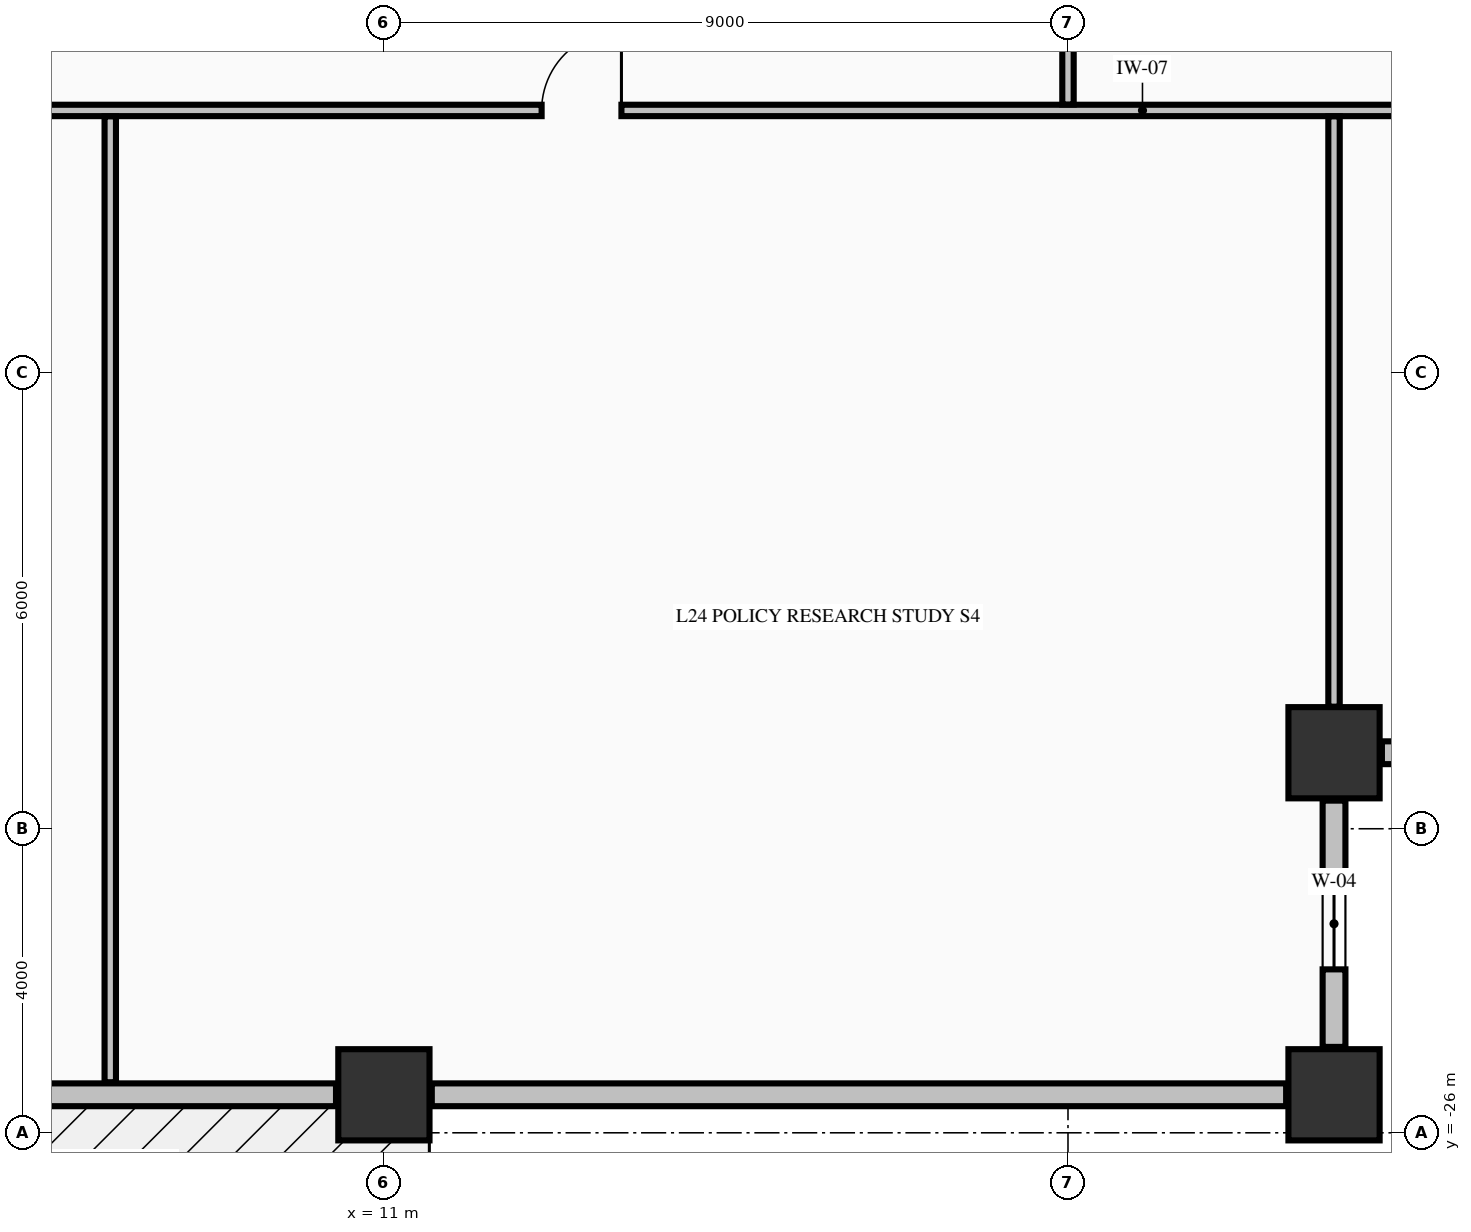
"""IFC4 building model, lengths in metres.
Left out: names, types, materials, properties, quantities, classifications, styles, units other than length and angle.
Written with IfcOpenShell. Run it as: python <this file> out.ifc"""

import sys

from ifc_helpers import new_model, si_unit, direction, frame, frame_2d, origin, origin_2d, place, context, subcontext, project, spatial, rectangle, extrude, element, fill, save


model = new_model("IFC4")
c1 = context("Model", 3, precision=1e-05, world=origin(), true_north=direction((0.0, 1.0)))
c2 = subcontext(c1, "Body", "Model", "MODEL_VIEW")
j1 = project(units=[si_unit("LENGTHUNIT", "METRE"), si_unit("PLANEANGLEUNIT", "RADIAN")], contexts=[c1])
p1 = place(None, origin())
s1 = spatial("IfcSite", under=j1, at=p1, CompositionType="ELEMENT")
p2 = place(p1, origin())
s2 = spatial("IfcBuilding", under=s1, at=p2, CompositionType="ELEMENT")
p3 = place(p2, frame((0.0, 0.0, 98.5)))
s3 = spatial("IfcBuildingStorey", under=s2, at=p3, CompositionType="ELEMENT", Elevation=98.5)
for number, where, z_axis, x_axis in (
    (1, (11.0, -25.5, -0.275), (0.0, 0.0, 1.0), (1.0, 0.0, 0.0)),
    (2, (23.5, -25.5, -0.275), (0.0, 0.0, 1.0), (1.0, 0.0, 0.0)),
    (3, (23.5, -21.0, -0.275), (0.0, 0.0, 1.0), (1.0, 0.0, 0.0)),
):
    element("IfcColumn", number, at=place(p3, frame(where, z_axis=z_axis, x_axis=x_axis)), inside=s3, PredefinedType="COLUMN", context=c2, shape_type="SweptSolid", body=[
        extrude(rectangle(XDim=1.2, YDim=1.2, at=origin_2d()), origin(), (0.0, 0.0, 1.0), 3.595),
    ])
p4 = place(p3, frame((23.5, -24.87, 0.0), z_axis=(0.0, 0.0, 1.0), x_axis=(0.0, 1.0, 0.0)))
e4 = element("IfcWall", 4, at=p4, inside=s3, PredefinedType="STANDARD", context=c2, shape_type="SweptSolid", body=[
    extrude(rectangle(XDim=3.24, YDim=0.3, at=frame_2d((1.62, 0.0))), origin(), (0.0, 0.0, 1.0), 2.712),
])
p5 = place(p4, frame((1.02, 0.0, 0.82)))
e5 = element("IfcOpeningElement", 5, at=p5, cuts=e4, PredefinedType="OPENING", context=c2, shape_type="SweptSolid", body=[
    extrude(rectangle(XDim=1.2, YDim=1.65, at=frame_2d((0.6, 0.825))), frame((0.0, 0.16, 0.0), z_axis=(0.0, -1.0, 0.0), x_axis=(1.0, 0.0, 0.0)), (0.0, 0.0, 1.0), 0.32),
])
p6 = place(p3, frame((24.13, -21.0, 0.0), z_axis=(0.0, 0.0, 1.0), x_axis=(1.0, 0.0, 0.0)))
e6 = element("IfcWall", 6, at=p6, inside=s3, PredefinedType="STANDARD", context=c2, shape_type="SweptSolid", body=[
    extrude(rectangle(XDim=3.24, YDim=0.3, at=frame_2d((1.62, 0.0))), origin(), (0.0, 0.0, 1.0), 2.712),
])
p7 = place(p6, frame((1.02, 0.0, 0.82)))
e7 = element("IfcOpeningElement", 7, at=p7, cuts=e6, PredefinedType="OPENING", context=c2, shape_type="SweptSolid", body=[
    extrude(rectangle(XDim=1.2, YDim=1.65, at=frame_2d((0.6, 0.825))), frame((0.0, 0.16, 0.0), z_axis=(0.0, -1.0, 0.0), x_axis=(1.0, 0.0, 0.0)), (0.0, 0.0, 1.0), 0.32),
])
p8 = place(p3, frame((0.63, -25.5, 0.0), z_axis=(0.0, 0.0, 1.0), x_axis=(1.0, 0.0, 0.0)))
e8 = element("IfcWall", 8, at=p8, inside=s3, PredefinedType="STANDARD", context=c2, shape_type="SweptSolid", body=[
    extrude(rectangle(XDim=9.74, YDim=0.3, at=frame_2d((4.87, 0.0))), origin(), (0.0, 0.0, 1.0), 2.712),
])
p9 = place(p8, frame((1.123, 0.0, 0.8)))
e9 = element("IfcOpeningElement", 9, at=p9, cuts=e8, PredefinedType="OPENING", context=c2, shape_type="SweptSolid", body=[
    extrude(rectangle(XDim=1.65, YDim=1.7, at=frame_2d((0.825, 0.85))), frame((0.0, 0.16, 0.0), z_axis=(0.0, -1.0, 0.0), x_axis=(1.0, 0.0, 0.0)), (0.0, 0.0, 1.0), 0.32),
])
p10 = place(p8, frame((3.071, 0.0, 0.8)))
e10 = element("IfcOpeningElement", 10, at=p10, cuts=e8, PredefinedType="OPENING", context=c2, shape_type="SweptSolid", body=[
    extrude(rectangle(XDim=1.65, YDim=1.7, at=frame_2d((0.825, 0.85))), frame((0.0, 0.16, 0.0), z_axis=(0.0, -1.0, 0.0), x_axis=(1.0, 0.0, 0.0)), (0.0, 0.0, 1.0), 0.32),
])
p11 = place(p3, frame((11.63, -25.5, 0.0), z_axis=(0.0, 0.0, 1.0), x_axis=(1.0, 0.0, 0.0)))
e11 = element("IfcWall", 11, at=p11, inside=s3, PredefinedType="STANDARD", context=c2, shape_type="SweptSolid", body=[
    extrude(rectangle(XDim=11.24, YDim=0.3, at=frame_2d((5.62, 0.0))), origin(), (0.0, 0.0, 1.0), 2.712),
])
p12 = place(p3, frame((-22.835, -12.55, 0.0), z_axis=(0.0, 0.0, 1.0), x_axis=(1.0, 0.0, 0.0)))
e12 = element("IfcWall", 12, at=p12, inside=s3, PredefinedType="PARTITIONING", context=c2, shape_type="SweptSolid", body=[
    extrude(rectangle(XDim=50.67, YDim=0.15, at=frame_2d((25.335, 0.0))), origin(), (0.0, 0.0, 1.0), 3.32),
])
p13 = place(p12, frame((7.01, 0.0, 0.0)))
e13 = element("IfcOpeningElement", 13, at=p13, cuts=e12, PredefinedType="OPENING", context=c2, shape_type="SweptSolid", body=[
    extrude(rectangle(XDim=0.95, YDim=2.15, at=frame_2d((0.475, 1.075))), frame((0.0, 0.085, 0.0), z_axis=(0.0, -1.0, 0.0), x_axis=(1.0, 0.0, 0.0)), (0.0, 0.0, 1.0), 0.17),
])
p14 = place(p12, frame((14.91, 0.0, 0.0)))
e14 = element("IfcOpeningElement", 14, at=p14, cuts=e12, PredefinedType="OPENING", context=c2, shape_type="SweptSolid", body=[
    extrude(rectangle(XDim=1.05, YDim=2.15, at=frame_2d((0.525, 1.075))), frame((0.0, 0.085, 0.0), z_axis=(0.0, -1.0, 0.0), x_axis=(1.0, 0.0, 0.0)), (0.0, 0.0, 1.0), 0.17),
])
p15 = place(p12, frame((24.71, 0.0, 0.0)))
e15 = element("IfcOpeningElement", 15, at=p15, cuts=e12, PredefinedType="OPENING", context=c2, shape_type="SweptSolid", body=[
    extrude(rectangle(XDim=1.05, YDim=2.15, at=frame_2d((0.525, 1.075))), frame((0.0, 0.085, 0.0), z_axis=(0.0, -1.0, 0.0), x_axis=(1.0, 0.0, 0.0)), (0.0, 0.0, 1.0), 0.17),
])
p16 = place(p12, frame((35.91, 0.0, 0.0)))
e16 = element("IfcOpeningElement", 16, at=p16, cuts=e12, PredefinedType="OPENING", context=c2, shape_type="SweptSolid", body=[
    extrude(rectangle(XDim=1.05, YDim=2.15, at=frame_2d((0.525, 1.075))), frame((0.0, 0.085, 0.0), z_axis=(0.0, -1.0, 0.0), x_axis=(1.0, 0.0, 0.0)), (0.0, 0.0, 1.0), 0.17),
])
p17 = place(p3, frame((7.4, -25.335, 0.0), z_axis=(0.0, 0.0, 1.0), x_axis=(0.0, 1.0, 0.0)))
e17 = element("IfcWall", 17, at=p17, inside=s3, PredefinedType="PARTITIONING", context=c2, shape_type="SweptSolid", body=[
    extrude(rectangle(XDim=12.707, YDim=0.15, at=frame_2d((6.354, 0.0))), origin(), (0.0, 0.0, 1.0), 3.32),
])
p18 = place(p3, frame((20.0, -12.472, 0.0), z_axis=(0.0, 0.0, 1.0), x_axis=(0.0, 1.0, 0.0)))
e18 = element("IfcWall", 18, at=p18, inside=s3, PredefinedType="PARTITIONING", context=c2, shape_type="SweptSolid", body=[
    extrude(rectangle(XDim=2.016, YDim=0.15, at=frame_2d((1.008, 0.0))), origin(), (0.0, 0.0, 1.0), 2.81),
])
p19 = place(p18, frame((0.747, 0.0, 0.0)))
e19 = element("IfcOpeningElement", 19, at=p19, cuts=e18, PredefinedType="OPENING", context=c2, shape_type="SweptSolid", body=[
    extrude(rectangle(XDim=0.95, YDim=2.15, at=frame_2d((0.475, 1.075))), frame((0.0, 0.085, 0.0), z_axis=(0.0, -1.0, 0.0), x_axis=(1.0, 0.0, 0.0)), (0.0, 0.0, 1.0), 0.17),
])
p20 = place(p3, frame((23.5, -20.394, 0.0), z_axis=(0.0, 0.0, 1.0), x_axis=(0.0, 1.0, 0.0)))
e20 = element("IfcWall", 20, at=p20, inside=s3, PredefinedType="PARTITIONING", context=c2, shape_type="SweptSolid", body=[
    extrude(rectangle(XDim=7.766, YDim=0.15, at=frame_2d((3.883, 0.0))), origin(), (0.0, 0.0, 1.0), 3.32),
])
p21 = place(p5, origin())
e21 = element("IfcWindow", 21, at=p21, inside=s3, PartitioningType="SINGLE_PANEL", PredefinedType="WINDOW", context=c2, shape_type="SweptSolid", body=[
    extrude(rectangle(XDim=1.2, YDim=1.65, at=frame_2d((0.6, 0.825))), frame((0.0, 0.03, 0.0), z_axis=(0.0, -1.0, 0.0), x_axis=(1.0, 0.0, 0.0)), (0.0, 0.0, 1.0), 0.06),
])
fill(e5, e21)
p22 = place(p16, origin())
e22 = element("IfcDoor", 22, at=p22, inside=s3, OperationType="SINGLE_SWING_RIGHT", PredefinedType="DOOR", context=c2, shape_type="SweptSolid", body=[
    extrude(rectangle(XDim=1.05, YDim=2.15, at=frame_2d((0.525, 1.075))), frame((0.0, 0.025, 0.0), z_axis=(0.0, -1.0, 0.0), x_axis=(1.0, 0.0, 0.0)), (0.0, 0.0, 1.0), 0.05),
])
fill(e16, e22)
save(model, sys.argv[1])
